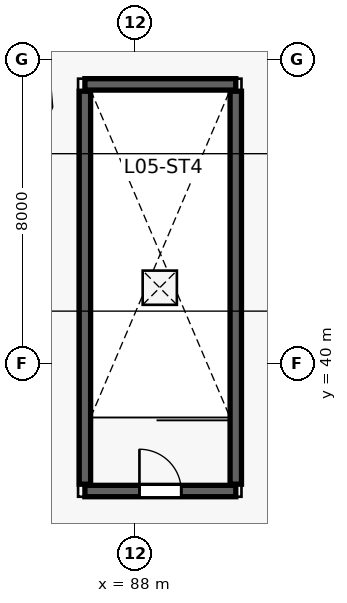
"""IFC4 building model, lengths in metres.
Left out: names, types, materials, properties, quantities, classifications, styles, units other than length and angle.
Written with IfcOpenShell. Run it as: python <this file> out.ifc"""

import sys

from ifc_helpers import new_model, si_unit, direction, frame, frame_2d, origin, origin_2d, place, context, subcontext, project, spatial, rectangle, extrude, source, transform, mapped, element, fill, save


model = new_model("IFC4")
c1 = context("Model", 3, precision=1e-05, world=origin(), true_north=direction((0.0, 1.0)))
c2 = subcontext(c1, "Body", "Model", "MODEL_VIEW")
j1 = project(units=[si_unit("LENGTHUNIT", "METRE"), si_unit("PLANEANGLEUNIT", "RADIAN")], contexts=[c1])
p1 = place(None, origin())
s1 = spatial("IfcSite", under=j1, at=p1, CompositionType="ELEMENT")
p2 = place(p1, origin())
s2 = spatial("IfcBuilding", under=s1, at=p2, CompositionType="ELEMENT")
p3 = place(p2, frame((0.0, 0.0, 30.0)))
s3 = spatial("IfcBuildingStorey", under=s2, at=p3, CompositionType="ELEMENT", Elevation=30.0)
m1 = source(origin(), c2, "Body", "SweptSolid", [
    extrude(rectangle(XDim=3.97, YDim=0.3, at=frame_2d((1.985, 0.0))), origin(), (0.0, 0.0, 1.0), 3.19),
])
p4 = place(p3, frame((86.68, 36.65, 0.0), z_axis=(0.0, 0.0, 1.0), x_axis=(1.0, 0.0, 0.0)))
e1 = element("IfcWall", 1, at=p4, inside=s3, PredefinedType="SOLIDWALL", context=c2, shape_type="MappedRepresentation", body=[
    mapped(m1, transform((0.0, 0.0, 0.0), scale=1.0)),
])
p5 = place(p4, frame((1.435, 0.0, 0.0)))
e2 = element("IfcOpeningElement", 2, at=p5, cuts=e1, PredefinedType="OPENING", context=c2, shape_type="SweptSolid", body=[
    extrude(rectangle(XDim=1.1, YDim=2.2, at=frame_2d((0.55, 1.1))), frame((0.0, 0.16, 0.0), z_axis=(0.0, -1.0, 0.0), x_axis=(1.0, 0.0, 0.0)), (0.0, 0.0, 1.0), 0.32),
])
p6 = place(p3, frame((86.68, 47.35, 0.0), z_axis=(0.0, 0.0, 1.0), x_axis=(1.0, 0.0, 0.0)))
e3 = element("IfcWall", 3, at=p6, inside=s3, PredefinedType="SOLIDWALL", context=c2, shape_type="MappedRepresentation", body=[
    mapped(m1, transform((0.0, 0.0, 0.0), scale=1.0)),
])
m2 = source(origin(), c2, "Body", "SweptSolid", [
    extrude(rectangle(XDim=10.34, YDim=0.3, at=frame_2d((5.17, 0.0))), origin(), (0.0, 0.0, 1.0), 3.19),
])
for number, where, z_axis, x_axis in (
    (4, (86.68, 36.83, 0.0), (0.0, 0.0, 1.0), (0.0, 1.0, 0.0)),
    (5, (90.65, 36.83, 0.0), (0.0, 0.0, 1.0), (0.0, 1.0, 0.0)),
):
    element("IfcWall", number, at=place(p3, frame(where, z_axis=z_axis, x_axis=x_axis)), inside=s3, PredefinedType="SOLIDWALL", context=c2, shape_type="MappedRepresentation", body=[
        mapped(m2, transform((0.0, 0.0, 0.0), scale=1.0)),
    ])
m3 = source(origin(), c2, "Body", "SweptSolid", [
    extrude(rectangle(XDim=1.1, YDim=2.2, at=frame_2d((0.55, 1.1))), frame((0.0, 0.025, 0.0), z_axis=(0.0, -1.0, 0.0), x_axis=(1.0, 0.0, 0.0)), (0.0, 0.0, 1.0), 0.05),
])
p7 = place(p5, origin())
e6 = element("IfcDoor", 6, at=p7, inside=s3, OperationType="SINGLE_SWING_LEFT", PredefinedType="DOOR", context=c2, shape_type="MappedRepresentation", body=[
    mapped(m3, transform((0.0, 0.0, 0.0), scale=1.0)),
])
fill(e2, e6)
p8 = place(p3, frame((0.0, 0.0, 3.19)))
p9 = place(p8, frame((88.65, 42.0, 0.16)))
e7 = element("IfcDoor", 7, at=p9, inside=s3, OperationType="SINGLE_SWING_LEFT", PredefinedType="TRAPDOOR", context=c2, shape_type="SweptSolid", body=[
    extrude(rectangle(XDim=0.9, YDim=0.9, at=origin_2d()), origin(), (0.0, 0.0, 1.0), 0.05),
])
save(model, sys.argv[1])
